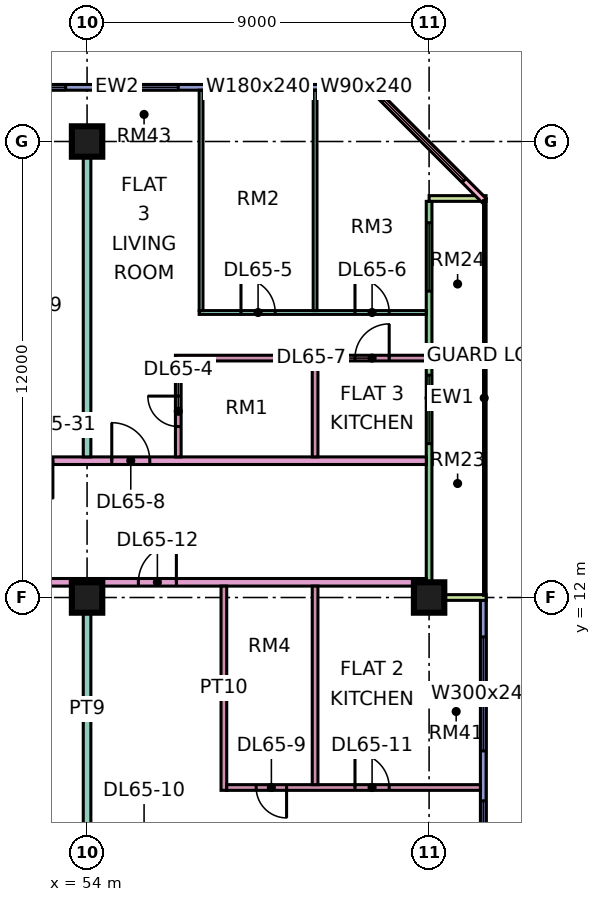
"""IFC4 building model, lengths in metres.
Left out: names, types, materials, properties, quantities, classifications, styles, units other than length and angle.
Written with IfcOpenShell. Run it as: python <this file> out.ifc"""

import sys

from ifc_helpers import new_model, si_unit, direction, frame, frame_2d, origin, origin_2d, place, context, subcontext, project, spatial, rectangle, extrude, element, fill, save


model = new_model("IFC4")
c1 = context("Model", 3, precision=1e-05, world=origin(), true_north=direction((0.0, 1.0)))
c2 = subcontext(c1, "Body", "Model", "MODEL_VIEW")
j1 = project(units=[si_unit("LENGTHUNIT", "METRE"), si_unit("PLANEANGLEUNIT", "RADIAN")], contexts=[c1])
p1 = place(None, origin())
s1 = spatial("IfcSite", under=j1, at=p1, CompositionType="ELEMENT")
p2 = place(p1, origin())
s2 = spatial("IfcBuilding", under=s1, at=p2, CompositionType="ELEMENT")
p3 = place(p2, frame((0.0, 0.0, 280.9)))
s3 = spatial("IfcBuildingStorey", under=s2, at=p3, CompositionType="ELEMENT", Elevation=280.9)
for number, where, z_axis, x_axis in (
    (1, (54.0, 12.0, 0.0), (0.0, 0.0, 1.0), (1.0, 0.0, 0.0)),
    (2, (54.0, 24.0, 0.0), (0.0, 0.0, 1.0), (1.0, 0.0, 0.0)),
    (3, (63.0, 12.0, 0.0), (0.0, 0.0, 1.0), (1.0, 0.0, 0.0)),
):
    element("IfcColumn", number, at=place(p3, frame(where, z_axis=z_axis, x_axis=x_axis)), inside=s3, PredefinedType="COLUMN", context=c2, shape_type="SweptSolid", body=[
        extrude(rectangle(XDim=0.8, YDim=0.8, at=origin_2d()), origin(), (0.0, 0.0, 1.0), 3.75),
    ])
p4 = place(p3, frame((61.5, 25.425, 0.0), z_axis=(0.0, 0.0, 1.0), x_axis=(-1.0, 0.0, 0.0)))
e4 = element("IfcWall", 4, at=p4, inside=s3, PredefinedType="SOLIDWALL", context=c2, shape_type="SweptSolid", body=[
    extrude(rectangle(XDim=13.425, YDim=0.15, at=frame_2d((6.712, 0.0))), origin(), (0.0, 0.0, 1.0), 3.35),
])
p5 = place(p4, frame((0.3, 0.0, 0.45)))
e5 = element("IfcOpeningElement", 5, at=p5, cuts=e4, PredefinedType="OPENING", context=c2, shape_type="SweptSolid", body=[
    extrude(rectangle(XDim=0.9, YDim=2.4, at=frame_2d((0.45, 1.2))), frame((0.0, 0.085, 0.0), z_axis=(0.0, -1.0, 0.0), x_axis=(1.0, 0.0, 0.0)), (0.0, 0.0, 1.0), 0.17),
])
p6 = place(p4, frame((2.1, 0.0, 0.45)))
e6 = element("IfcOpeningElement", 6, at=p6, cuts=e4, PredefinedType="OPENING", context=c2, shape_type="SweptSolid", body=[
    extrude(rectangle(XDim=1.8, YDim=2.4, at=frame_2d((0.9, 1.2))), frame((0.0, 0.085, 0.0), z_axis=(0.0, -1.0, 0.0), x_axis=(1.0, 0.0, 0.0)), (0.0, 0.0, 1.0), 0.17),
])
p7 = place(p4, frame((5.1, 0.0, 0.45)))
e7 = element("IfcOpeningElement", 7, at=p7, cuts=e4, PredefinedType="OPENING", context=c2, shape_type="SweptSolid", body=[
    extrude(rectangle(XDim=1.8, YDim=2.4, at=frame_2d((0.9, 1.2))), frame((0.0, 0.085, 0.0), z_axis=(0.0, -1.0, 0.0), x_axis=(1.0, 0.0, 0.0)), (0.0, 0.0, 1.0), 0.17),
])
p8 = place(p4, frame((8.062, 0.0, 0.45)))
e8 = element("IfcOpeningElement", 8, at=p8, cuts=e4, PredefinedType="OPENING", context=c2, shape_type="SweptSolid", body=[
    extrude(rectangle(XDim=4.8, YDim=2.4, at=frame_2d((2.4, 1.2))), frame((0.0, 0.085, 0.0), z_axis=(0.0, -1.0, 0.0), x_axis=(1.0, 0.0, 0.0)), (0.0, 0.0, 1.0), 0.17),
])
p9 = place(p3, frame((64.425, 1.5, 0.0), z_axis=(0.0, 0.0, 1.0), x_axis=(0.0, 1.0, 0.0)))
e9 = element("IfcWall", 9, at=p9, inside=s3, PredefinedType="SOLIDWALL", context=c2, shape_type="SweptSolid", body=[
    extrude(rectangle(XDim=10.425, YDim=0.15, at=frame_2d((5.212, 0.0))), origin(), (0.0, 0.0, 1.0), 3.35),
])
p10 = place(p9, frame((0.35, 0.0, 0.45)))
e10 = element("IfcOpeningElement", 10, at=p10, cuts=e9, PredefinedType="OPENING", context=c2, shape_type="SweptSolid", body=[
    extrude(rectangle(XDim=4.8, YDim=2.4, at=frame_2d((2.4, 1.2))), frame((0.0, 0.085, 0.0), z_axis=(0.0, -1.0, 0.0), x_axis=(1.0, 0.0, 0.0)), (0.0, 0.0, 1.0), 0.17),
])
p11 = place(p9, frame((6.462, 0.0, 0.45)))
e11 = element("IfcOpeningElement", 11, at=p11, cuts=e9, PredefinedType="OPENING", context=c2, shape_type="SweptSolid", body=[
    extrude(rectangle(XDim=3.0, YDim=2.4, at=frame_2d((1.5, 1.2))), frame((0.0, 0.085, 0.0), z_axis=(0.0, -1.0, 0.0), x_axis=(1.0, 0.0, 0.0)), (0.0, 0.0, 1.0), 0.17),
])
p12 = place(p3, frame((63.0, 12.075, 0.0), z_axis=(0.0, 0.0, 1.0), x_axis=(0.0, 1.0, 0.0)))
e12 = element("IfcWall", 12, at=p12, inside=s3, PredefinedType="SOLIDWALL", context=c2, shape_type="SweptSolid", body=[
    extrude(rectangle(XDim=10.35, YDim=0.15, at=frame_2d((5.175, 0.0))), origin(), (0.0, 0.0, 1.0), 3.35),
])
p13 = place(p12, frame((3.975, 0.0, 0.45)))
e13 = element("IfcOpeningElement", 13, at=p13, cuts=e12, PredefinedType="OPENING", context=c2, shape_type="SweptSolid", body=[
    extrude(rectangle(XDim=1.8, YDim=2.4, at=frame_2d((0.9, 1.2))), frame((0.0, 0.085, 0.0), z_axis=(0.0, -1.0, 0.0), x_axis=(1.0, 0.0, 0.0)), (0.0, 0.0, 1.0), 0.17),
])
p14 = place(p12, frame((7.988, 0.0, 0.45)))
e14 = element("IfcOpeningElement", 14, at=p14, cuts=e12, PredefinedType="OPENING", context=c2, shape_type="SweptSolid", body=[
    extrude(rectangle(XDim=1.8, YDim=2.4, at=frame_2d((0.9, 1.2))), frame((0.0, 0.085, 0.0), z_axis=(0.0, -1.0, 0.0), x_axis=(1.0, 0.0, 0.0)), (0.0, 0.0, 1.0), 0.17),
])
for number, where, z_axis, x_axis in (
    (15, (64.5, 12.0, 0.0), (0.0, 0.0, 1.0), (-1.0, 0.0, 0.0)),
    (16, (64.5, 22.5, 0.0), (0.0, 0.0, 1.0), (-1.0, 0.0, 0.0)),
):
    element("IfcWall", number, at=place(p3, frame(where, z_axis=z_axis, x_axis=x_axis)), inside=s3, PredefinedType="SOLIDWALL", context=c2, shape_type="SweptSolid", body=[
        extrude(rectangle(XDim=1.5, YDim=0.15, at=frame_2d((0.75, 0.0))), origin(), (0.0, 0.0, 1.0), 3.35),
    ])
p15 = place(p3, frame((64.447, 22.447, 0.0), z_axis=(0.0, 0.0, 1.0), x_axis=(-0.707106781187, 0.707106781187, 0.0)))
e17 = element("IfcWall", 17, at=p15, inside=s3, PredefinedType="SOLIDWALL", context=c2, shape_type="SweptSolid", body=[
    extrude(rectangle(XDim=4.243, YDim=0.15, at=frame_2d((2.121, 0.0))), origin(), (0.0, 0.0, 1.0), 3.35),
])
p16 = place(p15, frame((0.744, 0.0, 0.45)))
e18 = element("IfcOpeningElement", 18, at=p16, cuts=e17, PredefinedType="OPENING", context=c2, shape_type="SweptSolid", body=[
    extrude(rectangle(XDim=3.0, YDim=2.4, at=frame_2d((1.5, 1.2))), frame((0.0, 0.085, 0.0), z_axis=(0.0, -1.0, 0.0), x_axis=(1.0, 0.0, 0.0)), (0.0, 0.0, 1.0), 0.17),
])
p17 = place(p3, frame((40.65, 12.4, 0.0), z_axis=(0.0, 0.0, 1.0), x_axis=(1.0, 0.0, 0.0)))
e19 = element("IfcWall", 19, at=p17, inside=s3, PredefinedType="PARTITIONING", context=c2, shape_type="SweptSolid", body=[
    extrude(rectangle(XDim=22.276, YDim=0.2, at=frame_2d((11.138, 0.0))), origin(), (0.0, 0.0, 1.0), 3.35),
])
p18 = place(p17, frame((14.7, 0.0, 0.0)))
e20 = element("IfcOpeningElement", 20, at=p18, cuts=e19, PredefinedType="OPENING", context=c2, shape_type="SweptSolid", body=[
    extrude(rectangle(XDim=1.0, YDim=2.1, at=frame_2d((0.5, 1.05))), frame((0.0, 0.11, 0.0), z_axis=(0.0, -1.0, 0.0), x_axis=(1.0, 0.0, 0.0)), (0.0, 0.0, 1.0), 0.22),
])
p19 = place(p17, frame((1.05, 0.0, 0.0)))
e21 = element("IfcOpeningElement", 21, at=p19, cuts=e19, PredefinedType="OPENING", context=c2, shape_type="SweptSolid", body=[
    extrude(rectangle(XDim=1.0, YDim=2.1, at=frame_2d((0.5, 1.05))), frame((0.0, 0.11, 0.0), z_axis=(0.0, -1.0, 0.0), x_axis=(1.0, 0.0, 0.0)), (0.0, 0.0, 1.0), 0.22),
])
p20 = place(p3, frame((51.225, 15.6, 0.0), z_axis=(0.0, 0.0, 1.0), x_axis=(1.0, 0.0, 0.0)))
e22 = element("IfcWall", 22, at=p20, inside=s3, PredefinedType="PARTITIONING", context=c2, shape_type="SweptSolid", body=[
    extrude(rectangle(XDim=11.701, YDim=0.2, at=frame_2d((5.851, 0.0))), origin(), (0.0, 0.0, 1.0), 3.35),
])
p21 = place(p20, frame((3.425, 0.0, 0.0)))
e23 = element("IfcOpeningElement", 23, at=p21, cuts=e22, PredefinedType="OPENING", context=c2, shape_type="SweptSolid", body=[
    extrude(rectangle(XDim=1.0, YDim=2.1, at=frame_2d((0.5, 1.05))), frame((0.0, 0.11, 0.0), z_axis=(0.0, -1.0, 0.0), x_axis=(1.0, 0.0, 0.0)), (0.0, 0.0, 1.0), 0.22),
])
p22 = place(p20, frame((0.875, 0.0, 0.0)))
e24 = element("IfcOpeningElement", 24, at=p22, cuts=e22, PredefinedType="OPENING", context=c2, shape_type="SweptSolid", body=[
    extrude(rectangle(XDim=1.0, YDim=2.1, at=frame_2d((0.5, 1.05))), frame((0.0, 0.11, 0.0), z_axis=(0.0, -1.0, 0.0), x_axis=(1.0, 0.0, 0.0)), (0.0, 0.0, 1.0), 0.22),
])
p23 = place(p3, frame((54.0, 5.825, 0.0), z_axis=(0.0, 0.0, 1.0), x_axis=(0.0, 1.0, 0.0)))
e25 = element("IfcWall", 25, at=p23, inside=s3, PredefinedType="PARTITIONING", context=c2, shape_type="SweptSolid", body=[
    extrude(rectangle(XDim=6.475, YDim=0.2, at=frame_2d((3.238, 0.0))), origin(), (0.0, 0.0, 1.0), 3.35),
])
p24 = place(p3, frame((54.0, 15.7, 0.0), z_axis=(0.0, 0.0, 1.0), x_axis=(0.0, 1.0, 0.0)))
e26 = element("IfcWall", 26, at=p24, inside=s3, PredefinedType="PARTITIONING", context=c2, shape_type="SweptSolid", body=[
    extrude(rectangle(XDim=8.3, YDim=0.2, at=frame_2d((4.15, 0.0))), origin(), (0.0, 0.0, 1.0), 3.35),
])
p25 = place(p3, frame((56.325, 18.3, 0.0), z_axis=(0.0, 0.0, 1.0), x_axis=(1.0, 0.0, 0.0)))
e27 = element("IfcWall", 27, at=p25, inside=s3, PredefinedType="PARTITIONING", context=c2, shape_type="SweptSolid", body=[
    extrude(rectangle(XDim=6.601, YDim=0.15, at=frame_2d((3.301, 0.0))), origin(), (0.0, 0.0, 1.0), 3.35),
])
p26 = place(p25, frame((4.725, 0.0, 0.0)))
e28 = element("IfcOpeningElement", 28, at=p26, cuts=e27, PredefinedType="OPENING", context=c2, shape_type="SweptSolid", body=[
    extrude(rectangle(XDim=0.9, YDim=2.1, at=frame_2d((0.45, 1.05))), frame((0.0, 0.085, 0.0), z_axis=(0.0, -1.0, 0.0), x_axis=(1.0, 0.0, 0.0)), (0.0, 0.0, 1.0), 0.17),
])
p27 = place(p3, frame((56.4, 15.7, 0.0), z_axis=(0.0, 0.0, 1.0), x_axis=(0.0, 1.0, 0.0)))
e29 = element("IfcWall", 29, at=p27, inside=s3, PredefinedType="PARTITIONING", context=c2, shape_type="SweptSolid", body=[
    extrude(rectangle(XDim=2.525, YDim=0.15, at=frame_2d((1.263, 0.0))), origin(), (0.0, 0.0, 1.0), 3.35),
])
p28 = place(p27, frame((0.8, 0.0, 0.0)))
e30 = element("IfcOpeningElement", 30, at=p28, cuts=e29, PredefinedType="OPENING", context=c2, shape_type="SweptSolid", body=[
    extrude(rectangle(XDim=0.8, YDim=2.1, at=frame_2d((0.4, 1.05))), frame((0.0, 0.085, 0.0), z_axis=(0.0, -1.0, 0.0), x_axis=(1.0, 0.0, 0.0)), (0.0, 0.0, 1.0), 0.17),
])
p29 = place(p3, frame((56.95, 19.5, 0.0), z_axis=(0.0, 0.0, 1.0), x_axis=(1.0, 0.0, 0.0)))
e31 = element("IfcWall", 31, at=p29, inside=s3, PredefinedType="PARTITIONING", context=c2, shape_type="SweptSolid", body=[
    extrude(rectangle(XDim=5.976, YDim=0.1, at=frame_2d((2.988, 0.0))), origin(), (0.0, 0.0, 1.0), 3.35),
])
p30 = place(p29, frame((1.1, 0.0, 0.0)))
e32 = element("IfcOpeningElement", 32, at=p30, cuts=e31, PredefinedType="OPENING", context=c2, shape_type="SweptSolid", body=[
    extrude(rectangle(XDim=0.9, YDim=2.1, at=frame_2d((0.45, 1.05))), frame((0.0, 0.06, 0.0), z_axis=(0.0, -1.0, 0.0), x_axis=(1.0, 0.0, 0.0)), (0.0, 0.0, 1.0), 0.12),
])
p31 = place(p29, frame((4.1, 0.0, 0.0)))
e33 = element("IfcOpeningElement", 33, at=p31, cuts=e31, PredefinedType="OPENING", context=c2, shape_type="SweptSolid", body=[
    extrude(rectangle(XDim=0.9, YDim=2.1, at=frame_2d((0.45, 1.05))), frame((0.0, 0.06, 0.0), z_axis=(0.0, -1.0, 0.0), x_axis=(1.0, 0.0, 0.0)), (0.0, 0.0, 1.0), 0.12),
])
p32 = place(p3, frame((57.0, 19.55, 0.0), z_axis=(0.0, 0.0, 1.0), x_axis=(0.0, 1.0, 0.0)))
e34 = element("IfcWall", 34, at=p32, inside=s3, PredefinedType="PARTITIONING", context=c2, shape_type="SweptSolid", body=[
    extrude(rectangle(XDim=5.8, YDim=0.1, at=frame_2d((2.9, 0.0))), origin(), (0.0, 0.0, 1.0), 3.35),
])
p33 = place(p3, frame((57.6, 6.925, 0.0), z_axis=(0.0, 0.0, 1.0), x_axis=(0.0, 1.0, 0.0)))
e35 = element("IfcWall", 35, at=p33, inside=s3, PredefinedType="PARTITIONING", context=c2, shape_type="SweptSolid", body=[
    extrude(rectangle(XDim=5.375, YDim=0.15, at=frame_2d((2.688, 0.0))), origin(), (0.0, 0.0, 1.0), 3.35),
])
p34 = place(p3, frame((57.675, 7.0, 0.0), z_axis=(0.0, 0.0, 1.0), x_axis=(1.0, 0.0, 0.0)))
e36 = element("IfcWall", 36, at=p34, inside=s3, PredefinedType="PARTITIONING", context=c2, shape_type="SweptSolid", body=[
    extrude(rectangle(XDim=6.675, YDim=0.15, at=frame_2d((3.337, 0.0))), origin(), (0.0, 0.0, 1.0), 3.35),
])
p35 = place(p34, frame((0.775, 0.0, 0.0)))
e37 = element("IfcOpeningElement", 37, at=p35, cuts=e36, PredefinedType="OPENING", context=c2, shape_type="SweptSolid", body=[
    extrude(rectangle(XDim=0.8, YDim=2.1, at=frame_2d((0.4, 1.05))), frame((0.0, 0.085, 0.0), z_axis=(0.0, -1.0, 0.0), x_axis=(1.0, 0.0, 0.0)), (0.0, 0.0, 1.0), 0.17),
])
p36 = place(p34, frame((3.375, 0.0, 0.0)))
e38 = element("IfcOpeningElement", 38, at=p36, cuts=e36, PredefinedType="OPENING", context=c2, shape_type="SweptSolid", body=[
    extrude(rectangle(XDim=0.9, YDim=2.1, at=frame_2d((0.45, 1.05))), frame((0.0, 0.085, 0.0), z_axis=(0.0, -1.0, 0.0), x_axis=(1.0, 0.0, 0.0)), (0.0, 0.0, 1.0), 0.17),
])
p37 = place(p3, frame((60.0, 7.075, 0.0), z_axis=(0.0, 0.0, 1.0), x_axis=(0.0, 1.0, 0.0)))
e39 = element("IfcWall", 39, at=p37, inside=s3, PredefinedType="PARTITIONING", context=c2, shape_type="SweptSolid", body=[
    extrude(rectangle(XDim=5.225, YDim=0.15, at=frame_2d((2.613, 0.0))), origin(), (0.0, 0.0, 1.0), 3.35),
])
p38 = place(p3, frame((60.0, 15.7, 0.0), z_axis=(0.0, 0.0, 1.0), x_axis=(0.0, 1.0, 0.0)))
e40 = element("IfcWall", 40, at=p38, inside=s3, PredefinedType="PARTITIONING", context=c2, shape_type="SweptSolid", body=[
    extrude(rectangle(XDim=2.525, YDim=0.15, at=frame_2d((1.263, 0.0))), origin(), (0.0, 0.0, 1.0), 3.35),
])
p39 = place(p3, frame((60.0, 19.55, 0.0), z_axis=(0.0, 0.0, 1.0), x_axis=(0.0, 1.0, 0.0)))
e41 = element("IfcWall", 41, at=p39, inside=s3, PredefinedType="PARTITIONING", context=c2, shape_type="SweptSolid", body=[
    extrude(rectangle(XDim=5.801, YDim=0.1, at=frame_2d((2.9, 0.0))), origin(), (0.0, 0.0, 1.0), 3.35),
])
p40 = place(p5, origin())
e42 = element("IfcWindow", 42, at=p40, inside=s3, PartitioningType="SINGLE_PANEL", PredefinedType="WINDOW", context=c2, shape_type="SweptSolid", body=[
    extrude(rectangle(XDim=0.9, YDim=2.4, at=frame_2d((0.45, 1.2))), frame((0.0, 0.03, 0.0), z_axis=(0.0, -1.0, 0.0), x_axis=(1.0, 0.0, 0.0)), (0.0, 0.0, 1.0), 0.06),
])
fill(e5, e42)
p41 = place(p6, origin())
e43 = element("IfcWindow", 43, at=p41, inside=s3, PartitioningType="SINGLE_PANEL", PredefinedType="WINDOW", context=c2, shape_type="SweptSolid", body=[
    extrude(rectangle(XDim=1.8, YDim=2.4, at=frame_2d((0.9, 1.2))), frame((0.0, 0.03, 0.0), z_axis=(0.0, -1.0, 0.0), x_axis=(1.0, 0.0, 0.0)), (0.0, 0.0, 1.0), 0.06),
])
fill(e6, e43)
p42 = place(p7, origin())
e44 = element("IfcWindow", 44, at=p42, inside=s3, PartitioningType="SINGLE_PANEL", PredefinedType="WINDOW", context=c2, shape_type="SweptSolid", body=[
    extrude(rectangle(XDim=1.8, YDim=2.4, at=frame_2d((0.9, 1.2))), frame((0.0, 0.03, 0.0), z_axis=(0.0, -1.0, 0.0), x_axis=(1.0, 0.0, 0.0)), (0.0, 0.0, 1.0), 0.06),
])
fill(e7, e44)
p43 = place(p8, origin())
e45 = element("IfcWindow", 45, at=p43, inside=s3, PartitioningType="SINGLE_PANEL", PredefinedType="WINDOW", context=c2, shape_type="SweptSolid", body=[
    extrude(rectangle(XDim=4.8, YDim=2.4, at=frame_2d((2.4, 1.2))), frame((0.0, 0.03, 0.0), z_axis=(0.0, -1.0, 0.0), x_axis=(1.0, 0.0, 0.0)), (0.0, 0.0, 1.0), 0.06),
])
fill(e8, e45)
p44 = place(p10, origin())
e46 = element("IfcWindow", 46, at=p44, inside=s3, PartitioningType="SINGLE_PANEL", PredefinedType="WINDOW", context=c2, shape_type="SweptSolid", body=[
    extrude(rectangle(XDim=4.8, YDim=2.4, at=frame_2d((2.4, 1.2))), frame((0.0, 0.03, 0.0), z_axis=(0.0, -1.0, 0.0), x_axis=(1.0, 0.0, 0.0)), (0.0, 0.0, 1.0), 0.06),
])
fill(e10, e46)
p45 = place(p11, origin())
e47 = element("IfcWindow", 47, at=p45, inside=s3, PartitioningType="SINGLE_PANEL", PredefinedType="WINDOW", context=c2, shape_type="SweptSolid", body=[
    extrude(rectangle(XDim=3.0, YDim=2.4, at=frame_2d((1.5, 1.2))), frame((0.0, 0.03, 0.0), z_axis=(0.0, -1.0, 0.0), x_axis=(1.0, 0.0, 0.0)), (0.0, 0.0, 1.0), 0.06),
])
fill(e11, e47)
p46 = place(p13, origin())
e48 = element("IfcWindow", 48, at=p46, inside=s3, PartitioningType="SINGLE_PANEL", PredefinedType="WINDOW", context=c2, shape_type="SweptSolid", body=[
    extrude(rectangle(XDim=1.8, YDim=2.4, at=frame_2d((0.9, 1.2))), frame((0.0, 0.03, 0.0), z_axis=(0.0, -1.0, 0.0), x_axis=(1.0, 0.0, 0.0)), (0.0, 0.0, 1.0), 0.06),
])
fill(e13, e48)
p47 = place(p14, origin())
e49 = element("IfcWindow", 49, at=p47, inside=s3, PartitioningType="SINGLE_PANEL", PredefinedType="WINDOW", context=c2, shape_type="SweptSolid", body=[
    extrude(rectangle(XDim=1.8, YDim=2.4, at=frame_2d((0.9, 1.2))), frame((0.0, 0.03, 0.0), z_axis=(0.0, -1.0, 0.0), x_axis=(1.0, 0.0, 0.0)), (0.0, 0.0, 1.0), 0.06),
])
fill(e14, e49)
p48 = place(p16, origin())
e50 = element("IfcWindow", 50, at=p48, inside=s3, PartitioningType="SINGLE_PANEL", PredefinedType="WINDOW", context=c2, shape_type="SweptSolid", body=[
    extrude(rectangle(XDim=3.0, YDim=2.4, at=frame_2d((1.5, 1.2))), frame((0.0, 0.03, 0.0), z_axis=(0.0, -1.0, 0.0), x_axis=(1.0, 0.0, 0.0)), (0.0, 0.0, 1.0), 0.06),
])
fill(e18, e50)
p49 = place(p28, frame((0.8, 0.0, 0.0), z_axis=(0.0, 0.0, 1.0), x_axis=(-1.0, 0.0, 0.0)))
e51 = element("IfcDoor", 51, at=p49, inside=s3, OperationType="SINGLE_SWING_RIGHT", PredefinedType="DOOR", context=c2, shape_type="SweptSolid", body=[
    extrude(rectangle(XDim=0.8, YDim=2.1, at=frame_2d((0.4, 1.05))), frame((0.0, 0.025, 0.0), z_axis=(0.0, -1.0, 0.0), x_axis=(1.0, 0.0, 0.0)), (0.0, 0.0, 1.0), 0.05),
])
fill(e30, e51)
p50 = place(p30, origin())
e52 = element("IfcDoor", 52, at=p50, inside=s3, OperationType="SINGLE_SWING_LEFT", PredefinedType="DOOR", context=c2, shape_type="SweptSolid", body=[
    extrude(rectangle(XDim=0.9, YDim=2.1, at=frame_2d((0.45, 1.05))), frame((0.0, 0.025, 0.0), z_axis=(0.0, -1.0, 0.0), x_axis=(1.0, 0.0, 0.0)), (0.0, 0.0, 1.0), 0.05),
])
fill(e32, e52)
p51 = place(p31, origin())
e53 = element("IfcDoor", 53, at=p51, inside=s3, OperationType="SINGLE_SWING_LEFT", PredefinedType="DOOR", context=c2, shape_type="SweptSolid", body=[
    extrude(rectangle(XDim=0.9, YDim=2.1, at=frame_2d((0.45, 1.05))), frame((0.0, 0.025, 0.0), z_axis=(0.0, -1.0, 0.0), x_axis=(1.0, 0.0, 0.0)), (0.0, 0.0, 1.0), 0.05),
])
fill(e33, e53)
p52 = place(p26, frame((0.9, 0.0, 0.0), z_axis=(0.0, 0.0, 1.0), x_axis=(-1.0, 0.0, 0.0)))
e54 = element("IfcDoor", 54, at=p52, inside=s3, OperationType="SINGLE_SWING_RIGHT", PredefinedType="DOOR", context=c2, shape_type="SweptSolid", body=[
    extrude(rectangle(XDim=0.9, YDim=2.1, at=frame_2d((0.45, 1.05))), frame((0.0, 0.025, 0.0), z_axis=(0.0, -1.0, 0.0), x_axis=(1.0, 0.0, 0.0)), (0.0, 0.0, 1.0), 0.05),
])
fill(e28, e54)
p53 = place(p21, origin())
e55 = element("IfcDoor", 55, at=p53, inside=s3, OperationType="SINGLE_SWING_LEFT", PredefinedType="DOOR", context=c2, shape_type="SweptSolid", body=[
    extrude(rectangle(XDim=1.0, YDim=2.1, at=frame_2d((0.5, 1.05))), frame((0.0, 0.025, 0.0), z_axis=(0.0, -1.0, 0.0), x_axis=(1.0, 0.0, 0.0)), (0.0, 0.0, 1.0), 0.05),
])
fill(e23, e55)
p54 = place(p35, origin())
e56 = element("IfcDoor", 56, at=p54, inside=s3, OperationType="SINGLE_SWING_RIGHT", PredefinedType="DOOR", context=c2, shape_type="SweptSolid", body=[
    extrude(rectangle(XDim=0.8, YDim=2.1, at=frame_2d((0.4, 1.05))), frame((0.0, 0.025, 0.0), z_axis=(0.0, -1.0, 0.0), x_axis=(1.0, 0.0, 0.0)), (0.0, 0.0, 1.0), 0.05),
])
fill(e37, e56)
p55 = place(p36, origin())
e57 = element("IfcDoor", 57, at=p55, inside=s3, OperationType="SINGLE_SWING_LEFT", PredefinedType="DOOR", context=c2, shape_type="SweptSolid", body=[
    extrude(rectangle(XDim=0.9, YDim=2.1, at=frame_2d((0.45, 1.05))), frame((0.0, 0.025, 0.0), z_axis=(0.0, -1.0, 0.0), x_axis=(1.0, 0.0, 0.0)), (0.0, 0.0, 1.0), 0.05),
])
fill(e38, e57)
p56 = place(p18, frame((1.0, 0.0, 0.0), z_axis=(0.0, 0.0, 1.0), x_axis=(-1.0, 0.0, 0.0)))
e58 = element("IfcDoor", 58, at=p56, inside=s3, OperationType="SINGLE_SWING_RIGHT", PredefinedType="DOOR", context=c2, shape_type="SweptSolid", body=[
    extrude(rectangle(XDim=1.0, YDim=2.1, at=frame_2d((0.5, 1.05))), frame((0.0, 0.025, 0.0), z_axis=(0.0, -1.0, 0.0), x_axis=(1.0, 0.0, 0.0)), (0.0, 0.0, 1.0), 0.05),
])
fill(e20, e58)
p57 = place(p22, origin())
e59 = element("IfcDoor", 59, at=p57, inside=s3, OperationType="SINGLE_SWING_RIGHT", PredefinedType="DOOR", context=c2, shape_type="SweptSolid", body=[
    extrude(rectangle(XDim=1.0, YDim=2.1, at=frame_2d((0.5, 1.05))), frame((0.0, 0.025, 0.0), z_axis=(0.0, -1.0, 0.0), x_axis=(1.0, 0.0, 0.0)), (0.0, 0.0, 1.0), 0.05),
])
fill(e24, e59)
save(model, sys.argv[1])
